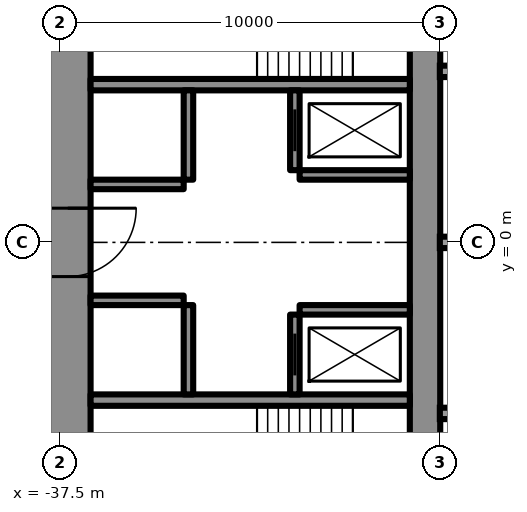
"""IFC4 building model, lengths in metres.
Left out: names, types, materials, properties, quantities, classifications, styles, units other than length and angle.
Written with IfcOpenShell. Run it as: python <this file> out.ifc"""

import sys

from ifc_helpers import new_model, si_unit, direction, frame, frame_2d, origin, place, context, subcontext, project, spatial, rectangle, extrude, element, fill, save


model = new_model("IFC4")
c1 = context("Model", 3, precision=1e-05, world=origin(), true_north=direction((0.0, 1.0)))
c2 = subcontext(c1, "Body", "Model", "MODEL_VIEW")
j1 = project(units=[si_unit("LENGTHUNIT", "METRE"), si_unit("PLANEANGLEUNIT", "RADIAN")], contexts=[c1])
p1 = place(None, origin())
s1 = spatial("IfcSite", under=j1, at=p1, CompositionType="ELEMENT")
p2 = place(p1, origin())
s2 = spatial("IfcBuilding", under=s1, at=p2, CompositionType="ELEMENT")
p3 = place(p2, frame((0.0, 0.0, 53.0)))
s3 = spatial("IfcBuildingStorey", under=s2, at=p3, CompositionType="ELEMENT", Elevation=53.0)
p4 = place(p3, frame((-27.9, 8.6, 0.0), z_axis=(0.0, 0.0, 1.0), x_axis=(0.0, -1.0, 0.0)))
e1 = element("IfcWall", 1, at=p4, inside=s3, PredefinedType="SHEAR", context=c2, shape_type="SweptSolid", body=[
    extrude(rectangle(XDim=17.2, YDim=0.8, at=frame_2d((8.6, 0.0))), origin(), (0.0, 0.0, 1.0), 3.5),
])
p5 = place(p4, frame((2.45, 0.0, 0.6)))
e2 = element("IfcOpeningElement", 2, at=p5, cuts=e1, PredefinedType="OPENING", context=c2, shape_type="SweptSolid", body=[
    extrude(rectangle(XDim=0.6, YDim=2.1, at=frame_2d((0.3, 1.05))), frame((0.0, 0.41, 0.0), z_axis=(0.0, -1.0, 0.0), x_axis=(1.0, 0.0, 0.0)), (0.0, 0.0, 1.0), 0.82),
])
p6 = place(p4, frame((14.15, 0.0, 0.6)))
e3 = element("IfcOpeningElement", 3, at=p6, cuts=e1, PredefinedType="OPENING", context=c2, shape_type="SweptSolid", body=[
    extrude(rectangle(XDim=0.6, YDim=2.1, at=frame_2d((0.3, 1.05))), frame((0.0, 0.41, 0.0), z_axis=(0.0, -1.0, 0.0), x_axis=(1.0, 0.0, 0.0)), (0.0, 0.0, 1.0), 0.82),
])
p7 = place(p3, frame((-37.3, 8.6, 0.0), z_axis=(0.0, 0.0, 1.0), x_axis=(0.0, -1.0, 0.0)))
e4 = element("IfcWall", 4, at=p7, inside=s3, PredefinedType="SHEAR", context=c2, shape_type="SweptSolid", body=[
    extrude(rectangle(XDim=17.2, YDim=1.2, at=frame_2d((8.6, 0.0))), origin(), (0.0, 0.0, 1.0), 3.5),
])
p8 = place(p7, frame((7.7, 0.0, 0.0)))
e5 = element("IfcOpeningElement", 5, at=p8, cuts=e4, PredefinedType="OPENING", context=c2, shape_type="SweptSolid", body=[
    extrude(rectangle(XDim=1.8, YDim=2.2, at=frame_2d((0.9, 1.1))), frame((0.0, 0.61, 0.0), z_axis=(0.0, -1.0, 0.0), x_axis=(1.0, 0.0, 0.0)), (0.0, 0.0, 1.0), 1.22),
])
for number, where, z_axis, x_axis in (
    (6, (-28.3, 4.15, 0.0), (0.0, 0.0, 1.0), (-1.0, 0.0, 0.0)),
    (7, (-28.3, -4.15, 0.0), (0.0, 0.0, 1.0), (-1.0, 0.0, 0.0)),
):
    element("IfcWall", number, at=place(p3, frame(where, z_axis=z_axis, x_axis=x_axis)), inside=s3, PredefinedType="SHEAR", context=c2, shape_type="SweptSolid", body=[
        extrude(rectangle(XDim=8.4, YDim=0.3, at=frame_2d((4.2, 0.0))), origin(), (0.0, 0.0, 1.0), 3.5),
    ])
p9 = place(p3, frame((-31.325, 4.0, 0.0), z_axis=(0.0, 0.0, 1.0), x_axis=(0.0, -1.0, 0.0)))
e8 = element("IfcWall", 8, at=p9, inside=s3, PredefinedType="SHEAR", context=c2, shape_type="SweptSolid", body=[
    extrude(rectangle(XDim=2.1, YDim=0.25, at=frame_2d((1.05, 0.0))), origin(), (0.0, 0.0, 1.0), 3.5),
])
p10 = place(p9, frame((0.5, 0.0, 0.0)))
e9 = element("IfcOpeningElement", 9, at=p10, cuts=e8, PredefinedType="OPENING", context=c2, shape_type="SweptSolid", body=[
    extrude(rectangle(XDim=1.1, YDim=2.2, at=frame_2d((0.55, 1.1))), frame((0.0, 0.135, 0.0), z_axis=(0.0, -1.0, 0.0), x_axis=(1.0, 0.0, 0.0)), (0.0, 0.0, 1.0), 0.27),
])
p11 = place(p3, frame((-34.125, 4.0, 0.0), z_axis=(0.0, 0.0, 1.0), x_axis=(0.0, -1.0, 0.0)))
e10 = element("IfcWall", 10, at=p11, inside=s3, PredefinedType="SHEAR", context=c2, shape_type="SweptSolid", body=[
    extrude(rectangle(XDim=2.35, YDim=0.25, at=frame_2d((1.175, 0.0))), origin(), (0.0, 0.0, 1.0), 3.5),
])
p12 = place(p3, frame((-28.3, 1.775, 0.0), z_axis=(0.0, 0.0, 1.0), x_axis=(-1.0, 0.0, 0.0)))
e11 = element("IfcWall", 11, at=p12, inside=s3, PredefinedType="SHEAR", context=c2, shape_type="SweptSolid", body=[
    extrude(rectangle(XDim=2.9, YDim=0.25, at=frame_2d((1.45, 0.0))), origin(), (0.0, 0.0, 1.0), 3.5),
])
p13 = place(p3, frame((-34.25, 1.525, 0.0), z_axis=(0.0, 0.0, 1.0), x_axis=(-1.0, 0.0, 0.0)))
e12 = element("IfcWall", 12, at=p13, inside=s3, PredefinedType="SHEAR", context=c2, shape_type="SweptSolid", body=[
    extrude(rectangle(XDim=2.45, YDim=0.25, at=frame_2d((1.225, 0.0))), origin(), (0.0, 0.0, 1.0), 3.5),
])
p14 = place(p3, frame((-31.325, -1.9, 0.0), z_axis=(0.0, 0.0, 1.0), x_axis=(0.0, -1.0, 0.0)))
e13 = element("IfcWall", 13, at=p14, inside=s3, PredefinedType="SHEAR", context=c2, shape_type="SweptSolid", body=[
    extrude(rectangle(XDim=2.1, YDim=0.25, at=frame_2d((1.05, 0.0))), origin(), (0.0, 0.0, 1.0), 3.5),
])
p15 = place(p14, frame((0.5, 0.0, 0.0)))
e14 = element("IfcOpeningElement", 14, at=p15, cuts=e13, PredefinedType="OPENING", context=c2, shape_type="SweptSolid", body=[
    extrude(rectangle(XDim=1.1, YDim=2.2, at=frame_2d((0.55, 1.1))), frame((0.0, 0.135, 0.0), z_axis=(0.0, -1.0, 0.0), x_axis=(1.0, 0.0, 0.0)), (0.0, 0.0, 1.0), 0.27),
])
p16 = place(p3, frame((-34.125, -1.65, 0.0), z_axis=(0.0, 0.0, 1.0), x_axis=(0.0, -1.0, 0.0)))
e15 = element("IfcWall", 15, at=p16, inside=s3, PredefinedType="SHEAR", context=c2, shape_type="SweptSolid", body=[
    extrude(rectangle(XDim=2.35, YDim=0.25, at=frame_2d((1.175, 0.0))), origin(), (0.0, 0.0, 1.0), 3.5),
])
p17 = place(p3, frame((-28.3, -1.775, 0.0), z_axis=(0.0, 0.0, 1.0), x_axis=(-1.0, 0.0, 0.0)))
e16 = element("IfcWall", 16, at=p17, inside=s3, PredefinedType="SHEAR", context=c2, shape_type="SweptSolid", body=[
    extrude(rectangle(XDim=2.9, YDim=0.25, at=frame_2d((1.45, 0.0))), origin(), (0.0, 0.0, 1.0), 3.5),
])
p18 = place(p3, frame((-34.25, -1.525, 0.0), z_axis=(0.0, 0.0, 1.0), x_axis=(-1.0, 0.0, 0.0)))
e17 = element("IfcWall", 17, at=p18, inside=s3, PredefinedType="SHEAR", context=c2, shape_type="SweptSolid", body=[
    extrude(rectangle(XDim=2.45, YDim=0.25, at=frame_2d((1.225, 0.0))), origin(), (0.0, 0.0, 1.0), 3.5),
])
p19 = place(p3, frame((-27.2, 14.3, 0.0), z_axis=(0.0, 0.0, 1.0), x_axis=(-0.866026593062, -0.499997940104, 0.0)))
e18 = element("IfcWall", 18, at=p19, inside=s3, PredefinedType="SHEAR", context=c2, shape_type="SweptSolid", body=[
    extrude(rectangle(XDim=28.946, YDim=1.2, at=frame_2d((14.473, 0.0))), origin(), (0.0, 0.0, 1.0), 3.5),
])
p20 = place(p19, frame((4.6, 0.0, 0.0)))
e19 = element("IfcOpeningElement", 19, at=p20, cuts=e18, PredefinedType="OPENING", context=c2, shape_type="SweptSolid", body=[
    extrude(rectangle(XDim=1.0, YDim=2.2, at=frame_2d((0.5, 1.1))), frame((0.0, 0.61, 0.0), z_axis=(0.0, -1.0, 0.0), x_axis=(1.0, 0.0, 0.0)), (0.0, 0.0, 1.0), 1.22),
])
p21 = place(p19, frame((13.395, 0.0, 0.0)))
e20 = element("IfcOpeningElement", 20, at=p21, cuts=e18, PredefinedType="OPENING", context=c2, shape_type="SweptSolid", body=[
    extrude(rectangle(XDim=1.8, YDim=2.2, at=frame_2d((0.9, 1.1))), frame((0.0, 0.61, 0.0), z_axis=(0.0, -1.0, 0.0), x_axis=(1.0, 0.0, 0.0)), (0.0, 0.0, 1.0), 1.22),
])
p22 = place(p3, frame((-27.2, -14.3, 0.0), z_axis=(0.0, 0.0, 1.0), x_axis=(-0.866024021859, 0.500002393557, 0.0)))
e21 = element("IfcWall", 21, at=p22, inside=s3, PredefinedType="SHEAR", context=c2, shape_type="SweptSolid", body=[
    extrude(rectangle(XDim=27.907, YDim=1.2, at=frame_2d((13.954, 0.0))), origin(), (0.0, 0.0, 1.0), 3.5),
])
p23 = place(p22, frame((4.6, 0.0, 0.0)))
e22 = element("IfcOpeningElement", 22, at=p23, cuts=e21, PredefinedType="OPENING", context=c2, shape_type="SweptSolid", body=[
    extrude(rectangle(XDim=1.0, YDim=2.2, at=frame_2d((0.5, 1.1))), frame((0.0, 0.61, 0.0), z_axis=(0.0, -1.0, 0.0), x_axis=(1.0, 0.0, 0.0)), (0.0, 0.0, 1.0), 1.22),
])
p24 = place(p22, frame((13.395, 0.0, 0.0)))
e23 = element("IfcOpeningElement", 23, at=p24, cuts=e21, PredefinedType="OPENING", context=c2, shape_type="SweptSolid", body=[
    extrude(rectangle(XDim=1.8, YDim=2.2, at=frame_2d((0.9, 1.1))), frame((0.0, 0.61, 0.0), z_axis=(0.0, -1.0, 0.0), x_axis=(1.0, 0.0, 0.0)), (0.0, 0.0, 1.0), 1.22),
])
p25 = place(p3, frame((-37.7, 10.894, 0.0), z_axis=(0.0, 0.0, 1.0), x_axis=(-0.866027905338, -0.499995667157, 0.0)))
e24 = element("IfcWall", 24, at=p25, inside=s3, PredefinedType="PARTITIONING", context=c2, shape_type="SweptSolid", body=[
    extrude(rectangle(XDim=21.787, YDim=0.2, at=frame_2d((10.894, 0.0))), origin(), (0.0, 0.0, 1.0), 3.25),
])
p26 = place(p25, frame((20.237, 0.0, 0.0)))
e25 = element("IfcOpeningElement", 25, at=p26, cuts=e24, PredefinedType="OPENING", context=c2, shape_type="SweptSolid", body=[
    extrude(rectangle(XDim=0.95, YDim=2.2, at=frame_2d((0.475, 1.1))), frame((0.0, 0.11, 0.0), z_axis=(0.0, -1.0, 0.0), x_axis=(1.0, 0.0, 0.0)), (0.0, 0.0, 1.0), 0.22),
])
p27 = place(p25, frame((2.95, 0.0, 0.0)))
e26 = element("IfcOpeningElement", 26, at=p27, cuts=e24, PredefinedType="OPENING", context=c2, shape_type="SweptSolid", body=[
    extrude(rectangle(XDim=0.95, YDim=2.2, at=frame_2d((0.475, 1.1))), frame((0.0, 0.11, 0.0), z_axis=(0.0, -1.0, 0.0), x_axis=(1.0, 0.0, 0.0)), (0.0, 0.0, 1.0), 0.22),
])
p28 = place(p8, origin())
e27 = element("IfcDoor", 27, at=p28, inside=s3, OperationType="DOUBLE_DOOR_SINGLE_SWING", PredefinedType="DOOR", context=c2, shape_type="SweptSolid", body=[
    extrude(rectangle(XDim=1.8, YDim=2.2, at=frame_2d((0.9, 1.1))), frame((0.0, 0.025, 0.0), z_axis=(0.0, -1.0, 0.0), x_axis=(1.0, 0.0, 0.0)), (0.0, 0.0, 1.0), 0.05),
])
fill(e5, e27)
p29 = place(p10, origin())
e28 = element("IfcDoor", 28, at=p29, inside=s3, OperationType="SLIDING_TO_LEFT", PredefinedType="USERDEFINED", context=c2, shape_type="SweptSolid", body=[
    extrude(rectangle(XDim=1.1, YDim=2.2, at=frame_2d((0.55, 1.1))), frame((0.0, 0.025, 0.0), z_axis=(0.0, -1.0, 0.0), x_axis=(1.0, 0.0, 0.0)), (0.0, 0.0, 1.0), 0.05),
])
fill(e9, e28)
p30 = place(p15, origin())
e29 = element("IfcDoor", 29, at=p30, inside=s3, OperationType="SLIDING_TO_LEFT", PredefinedType="USERDEFINED", context=c2, shape_type="SweptSolid", body=[
    extrude(rectangle(XDim=1.1, YDim=2.2, at=frame_2d((0.55, 1.1))), frame((0.0, 0.025, 0.0), z_axis=(0.0, -1.0, 0.0), x_axis=(1.0, 0.0, 0.0)), (0.0, 0.0, 1.0), 0.05),
])
fill(e14, e29)
save(model, sys.argv[1])
